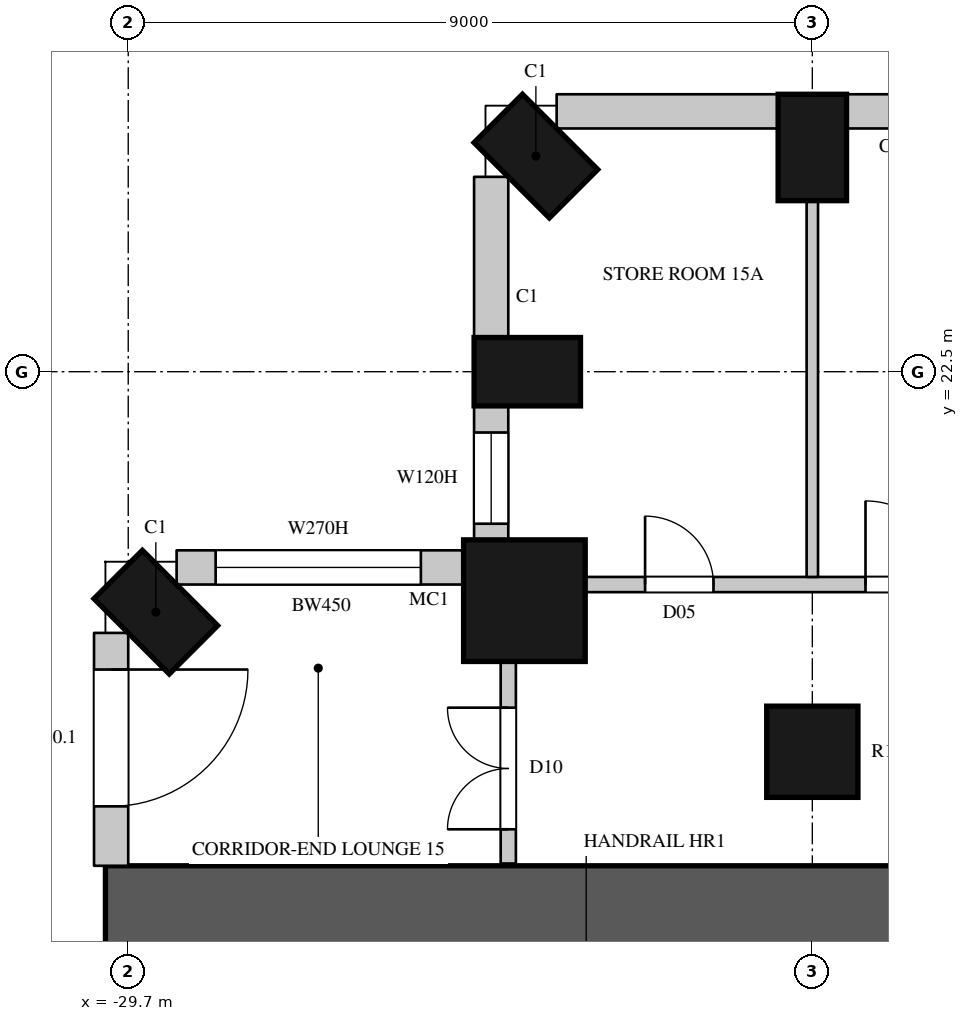
"""IFC4 building model, lengths in metres.
Left out: names, types, materials, properties, quantities, classifications, styles, units other than length and angle.
Written with IfcOpenShell. Run it as: python <this file> out.ifc"""

import sys

from ifc_helpers import new_model, si_unit, direction, frame, frame_2d, origin, origin_2d, place, context, subcontext, project, spatial, rectangle, circle, extrude, element, fill, save


model = new_model("IFC4")
c1 = context("Model", 3, precision=1e-05, world=origin(), true_north=direction((0.0, 1.0)))
c2 = subcontext(c1, "Body", "Model", "MODEL_VIEW")
j1 = project(units=[si_unit("LENGTHUNIT", "METRE"), si_unit("PLANEANGLEUNIT", "RADIAN")], contexts=[c1])
p1 = place(None, origin())
s1 = spatial("IfcSite", under=j1, at=p1, CompositionType="ELEMENT")
p2 = place(p1, origin())
s2 = spatial("IfcBuilding", under=s1, at=p2, CompositionType="ELEMENT")
p3 = place(p2, frame((0.0, 0.0, 84.3)))
s3 = spatial("IfcBuildingStorey", under=s2, at=p3, CompositionType="ELEMENT", Elevation=84.3)
for number, where, z_axis, x_axis in (
    (1, (-29.337, 19.337, 0.0), (0.0, 0.0, 1.0), (-0.707, -0.707, 0.0)),
    (2, (-20.7, 25.45, 0.0), (0.0, 0.0, 1.0), (-1.0, 0.0, 0.0)),
    (3, (-24.337, 25.337, 0.0), (0.0, 0.0, 1.0), (-0.707, -0.707, 0.0)),
    (4, (-24.45, 22.5, 0.0), (0.0, 0.0, 1.0), (0.0, -1.0, 0.0)),
):
    element("IfcColumn", number, at=place(p3, frame(where, z_axis=z_axis, x_axis=x_axis)), inside=s3, PredefinedType="COLUMN", context=c2, shape_type="SweptSolid", body=[
        extrude(rectangle(XDim=0.9, YDim=1.4, at=origin_2d()), origin(), (0.0, 0.0, 1.0), 3.6),
    ])
p4 = place(p3, frame((-24.488, 19.488, 0.0), z_axis=(0.0, 0.0, 1.0), x_axis=(1.0, 0.0, 0.0)))
e5 = element("IfcColumn", 5, at=p4, inside=s3, PredefinedType="COLUMN", context=c2, shape_type="SweptSolid", body=[
    extrude(circle(Radius=0.8, at=origin_2d()), origin(), (0.0, 0.0, 1.0), 3.6),
])
p5 = place(p3, frame((-20.7, 17.5, 0.0), z_axis=(0.0, 0.0, 1.0), x_axis=(1.0, 0.0, 0.0)))
e6 = element("IfcColumn", 6, at=p5, inside=s3, PredefinedType="COLUMN", context=c2, shape_type="SweptSolid", body=[
    extrude(circle(Radius=0.6, at=origin_2d()), origin(), (0.0, 0.0, 1.0), 3.6),
])
p6 = place(p3, frame((-29.925, 19.064, 0.0), z_axis=(0.0, 0.0, 1.0), x_axis=(0.0, -1.0, 0.0)))
e7 = element("IfcWall", 7, at=p6, inside=s3, PredefinedType="SOLIDWALL", context=c2, shape_type="SweptSolid", body=[
    extrude(rectangle(XDim=3.064, YDim=0.45, at=frame_2d((1.532, 0.0))), origin(), (0.0, 0.0, 1.0), 3.3),
])
p7 = place(p6, frame((0.482, 0.0, 0.0)))
e8 = element("IfcOpeningElement", 8, at=p7, cuts=e7, PredefinedType="OPENING", context=c2, shape_type="SweptSolid", body=[
    extrude(rectangle(XDim=1.8, YDim=2.4, at=frame_2d((0.9, 1.2))), frame((0.0, 0.235, 0.0), z_axis=(0.0, -1.0, 0.0), x_axis=(1.0, 0.0, 0.0)), (0.0, 0.0, 1.0), 0.47),
])
p8 = place(p3, frame((-12.15, 25.925, 0.0), z_axis=(0.0, 0.0, 1.0), x_axis=(-1.0, 0.0, 0.0)))
e9 = element("IfcWall", 9, at=p8, inside=s3, PredefinedType="SOLIDWALL", context=c2, shape_type="SweptSolid", body=[
    extrude(rectangle(XDim=8.1, YDim=0.45, at=frame_2d((4.05, 0.0))), origin(), (0.0, 0.0, 1.0), 3.3),
])
p9 = place(p8, frame((0.2, 0.0, 0.0)))
e10 = element("IfcOpeningElement", 10, at=p9, cuts=e9, PredefinedType="OPENING", context=c2, shape_type="SweptSolid", body=[
    extrude(rectangle(XDim=1.8, YDim=2.4, at=frame_2d((0.9, 1.2))), frame((0.0, 0.235, 0.0), z_axis=(0.0, -1.0, 0.0), x_axis=(1.0, 0.0, 0.0)), (0.0, 0.0, 1.0), 0.47),
])
p10 = place(p8, frame((2.2, 0.0, 1.05)))
e11 = element("IfcOpeningElement", 11, at=p10, cuts=e9, PredefinedType="OPENING", context=c2, shape_type="SweptSolid", body=[
    extrude(rectangle(XDim=1.2, YDim=2.0, at=frame_2d((0.6, 1.0))), frame((0.0, 0.235, 0.0), z_axis=(0.0, -1.0, 0.0), x_axis=(1.0, 0.0, 0.0)), (0.0, 0.0, 1.0), 0.47),
])
p11 = place(p8, frame((5.4, 0.0, 0.0)))
e12 = element("IfcOpeningElement", 12, at=p11, cuts=e9, PredefinedType="OPENING", context=c2, shape_type="SweptSolid", body=[
    extrude(rectangle(XDim=1.8, YDim=2.4, at=frame_2d((0.9, 1.2))), frame((0.0, 0.235, 0.0), z_axis=(0.0, -1.0, 0.0), x_axis=(1.0, 0.0, 0.0)), (0.0, 0.0, 1.0), 0.47),
])
p12 = place(p3, frame((-21.15, 25.925, 0.0), z_axis=(0.0, 0.0, 1.0), x_axis=(-1.0, 0.0, 0.0)))
e13 = element("IfcWall", 13, at=p12, inside=s3, PredefinedType="SOLIDWALL", context=c2, shape_type="SweptSolid", body=[
    extrude(rectangle(XDim=2.914, YDim=0.45, at=frame_2d((1.457, 0.0))), origin(), (0.0, 0.0, 1.0), 3.3),
])
p13 = place(p3, frame((-24.925, 25.064, 0.0), z_axis=(0.0, 0.0, 1.0), x_axis=(0.0, -1.0, 0.0)))
e14 = element("IfcWall", 14, at=p13, inside=s3, PredefinedType="SOLIDWALL", context=c2, shape_type="SweptSolid", body=[
    extrude(rectangle(XDim=2.114, YDim=0.45, at=frame_2d((1.057, 0.0))), origin(), (0.0, 0.0, 1.0), 3.3),
])
p14 = place(p3, frame((-24.925, 22.05, 0.0), z_axis=(0.0, 0.0, 1.0), x_axis=(0.0, -1.0, 0.0)))
e15 = element("IfcWall", 15, at=p14, inside=s3, PredefinedType="SOLIDWALL", context=c2, shape_type="SweptSolid", body=[
    extrude(rectangle(XDim=1.792, YDim=0.45, at=frame_2d((0.896, 0.0))), origin(), (0.0, 0.0, 1.0), 3.3),
])
p15 = place(p14, frame((0.35, 0.0, 1.05)))
e16 = element("IfcOpeningElement", 16, at=p15, cuts=e15, PredefinedType="OPENING", context=c2, shape_type="SweptSolid", body=[
    extrude(rectangle(XDim=1.2, YDim=2.0, at=frame_2d((0.6, 1.0))), frame((0.0, 0.235, 0.0), z_axis=(0.0, -1.0, 0.0), x_axis=(1.0, 0.0, 0.0)), (0.0, 0.0, 1.0), 0.47),
])
p16 = place(p3, frame((-25.259, 19.925, 0.0), z_axis=(0.0, 0.0, 1.0), x_axis=(-1.0, 0.0, 0.0)))
e17 = element("IfcWall", 17, at=p16, inside=s3, PredefinedType="SOLIDWALL", context=c2, shape_type="SweptSolid", body=[
    extrude(rectangle(XDim=3.805, YDim=0.45, at=frame_2d((1.903, 0.0))), origin(), (0.0, 0.0, 1.0), 3.3),
])
p17 = place(p16, frame((0.592, 0.0, 1.05)))
e18 = element("IfcOpeningElement", 18, at=p17, cuts=e17, PredefinedType="OPENING", context=c2, shape_type="SweptSolid", body=[
    extrude(rectangle(XDim=2.7, YDim=2.0, at=frame_2d((1.35, 1.0))), frame((0.0, 0.235, 0.0), z_axis=(0.0, -1.0, 0.0), x_axis=(1.0, 0.0, 0.0)), (0.0, 0.0, 1.0), 0.47),
])
p18 = place(p3, frame((-30.0, 15.4, 0.0), z_axis=(0.0, 0.0, 1.0), x_axis=(1.0, 0.0, 0.0)))
e19 = element("IfcWall", 19, at=p18, inside=s3, PredefinedType="SHEAR", context=c2, shape_type="SweptSolid", body=[
    extrude(rectangle(XDim=16.0, YDim=1.2, at=frame_2d((8.0, 0.0))), origin(), (0.0, 0.0, 1.0), 3.6),
])
p19 = place(p18, frame((13.4, 0.0, 0.0)))
e20 = element("IfcOpeningElement", 20, at=p19, cuts=e19, PredefinedType="OPENING", context=c2, shape_type="SweptSolid", body=[
    extrude(rectangle(XDim=1.5, YDim=2.4, at=frame_2d((0.75, 1.2))), frame((0.0, 0.61, 0.0), z_axis=(0.0, -1.0, 0.0), x_axis=(1.0, 0.0, 0.0)), (0.0, 0.0, 1.0), 1.22),
])
p20 = place(p3, frame((-24.7, 16.03, 0.0), z_axis=(0.0, 0.0, 1.0), x_axis=(0.0, 1.0, 0.0)))
e21 = element("IfcWall", 21, at=p20, inside=s3, PredefinedType="PARTITIONING", context=c2, shape_type="SweptSolid", body=[
    extrude(rectangle(XDim=2.67, YDim=0.2, at=frame_2d((1.335, 0.0))), origin(), (0.0, 0.0, 1.0), 3.3),
])
p21 = place(p20, frame((0.45, 0.0, 0.0)))
e22 = element("IfcOpeningElement", 22, at=p21, cuts=e21, PredefinedType="OPENING", context=c2, shape_type="SweptSolid", body=[
    extrude(rectangle(XDim=1.6, YDim=2.4, at=frame_2d((0.8, 1.2))), frame((0.0, 0.11, 0.0), z_axis=(0.0, -1.0, 0.0), x_axis=(1.0, 0.0, 0.0)), (0.0, 0.0, 1.0), 0.22),
])
p22 = place(p3, frame((-23.7, 19.7, 0.0), z_axis=(0.0, 0.0, 1.0), x_axis=(1.0, 0.0, 0.0)))
e23 = element("IfcWall", 23, at=p22, inside=s3, PredefinedType="PARTITIONING", context=c2, shape_type="SweptSolid", body=[
    extrude(rectangle(XDim=5.1, YDim=0.2, at=frame_2d((2.55, 0.0))), origin(), (0.0, 0.0, 1.0), 3.3),
])
p23 = place(p22, frame((0.8, 0.0, 0.0)))
e24 = element("IfcOpeningElement", 24, at=p23, cuts=e23, PredefinedType="OPENING", context=c2, shape_type="SweptSolid", body=[
    extrude(rectangle(XDim=0.9, YDim=2.2, at=frame_2d((0.45, 1.1))), frame((0.0, 0.11, 0.0), z_axis=(0.0, -1.0, 0.0), x_axis=(1.0, 0.0, 0.0)), (0.0, 0.0, 1.0), 0.22),
])
p24 = place(p22, frame((3.7, 0.0, 0.0)))
e25 = element("IfcOpeningElement", 25, at=p24, cuts=e23, PredefinedType="OPENING", context=c2, shape_type="SweptSolid", body=[
    extrude(rectangle(XDim=1.1, YDim=2.4, at=frame_2d((0.55, 1.2))), frame((0.0, 0.11, 0.0), z_axis=(0.0, -1.0, 0.0), x_axis=(1.0, 0.0, 0.0)), (0.0, 0.0, 1.0), 0.22),
])
p25 = place(p3, frame((-20.7, 19.8, 0.0), z_axis=(0.0, 0.0, 1.0), x_axis=(0.0, 1.0, 0.0)))
e26 = element("IfcWall", 26, at=p25, inside=s3, PredefinedType="PARTITIONING", context=c2, shape_type="SweptSolid", body=[
    extrude(rectangle(XDim=4.95, YDim=0.15, at=frame_2d((2.475, 0.0))), origin(), (0.0, 0.0, 1.0), 2.75),
])
p26 = place(p7, origin())
e27 = element("IfcDoor", 27, at=p26, inside=s3, OperationType="SLIDING_TO_LEFT", PredefinedType="DOOR", context=c2, shape_type="SweptSolid", body=[
    extrude(rectangle(XDim=1.8, YDim=2.4, at=frame_2d((0.9, 1.2))), frame((0.0, 0.13, 0.0), z_axis=(0.0, -1.0, 0.0), x_axis=(1.0, 0.0, 0.0)), (0.0, 0.0, 1.0), 0.05),
])
fill(e8, e27)
p27 = place(p15, origin())
e28 = element("IfcWindow", 28, at=p27, inside=s3, PartitioningType="SINGLE_PANEL", PredefinedType="WINDOW", context=c2, shape_type="SweptSolid", body=[
    extrude(rectangle(XDim=1.2, YDim=2.0, at=frame_2d((0.6, 1.0))), frame((0.0, 0.135, 0.0), z_axis=(0.0, -1.0, 0.0), x_axis=(1.0, 0.0, 0.0)), (0.0, 0.0, 1.0), 0.06),
])
fill(e16, e28)
p28 = place(p17, origin())
e29 = element("IfcWindow", 29, at=p28, inside=s3, PartitioningType="SINGLE_PANEL", PredefinedType="WINDOW", context=c2, shape_type="SweptSolid", body=[
    extrude(rectangle(XDim=2.7, YDim=2.0, at=frame_2d((1.35, 1.0))), frame((0.0, 0.135, 0.0), z_axis=(0.0, -1.0, 0.0), x_axis=(1.0, 0.0, 0.0)), (0.0, 0.0, 1.0), 0.06),
])
fill(e18, e29)
p29 = place(p23, origin())
e30 = element("IfcDoor", 30, at=p29, inside=s3, OperationType="SINGLE_SWING_LEFT", PredefinedType="DOOR", context=c2, shape_type="SweptSolid", body=[
    extrude(rectangle(XDim=0.9, YDim=2.2, at=frame_2d((0.45, 1.1))), frame((0.0, 0.025, 0.0), z_axis=(0.0, -1.0, 0.0), x_axis=(1.0, 0.0, 0.0)), (0.0, 0.0, 1.0), 0.05),
])
fill(e24, e30)
p30 = place(p21, origin())
e31 = element("IfcDoor", 31, at=p30, inside=s3, OperationType="DOUBLE_DOOR_SINGLE_SWING", PredefinedType="DOOR", context=c2, shape_type="SweptSolid", body=[
    extrude(rectangle(XDim=1.6, YDim=2.4, at=frame_2d((0.8, 1.2))), frame((0.0, 0.025, 0.0), z_axis=(0.0, -1.0, 0.0), x_axis=(1.0, 0.0, 0.0)), (0.0, 0.0, 1.0), 0.05),
])
fill(e22, e31)
p31 = place(p24, origin())
e32 = element("IfcDoor", 32, at=p31, inside=s3, OperationType="SINGLE_SWING_LEFT", PredefinedType="DOOR", context=c2, shape_type="SweptSolid", body=[
    extrude(rectangle(XDim=1.1, YDim=2.4, at=frame_2d((0.55, 1.2))), frame((0.0, 0.025, 0.0), z_axis=(0.0, -1.0, 0.0), x_axis=(1.0, 0.0, 0.0)), (0.0, 0.0, 1.0), 0.05),
])
fill(e25, e32)
save(model, sys.argv[1])
